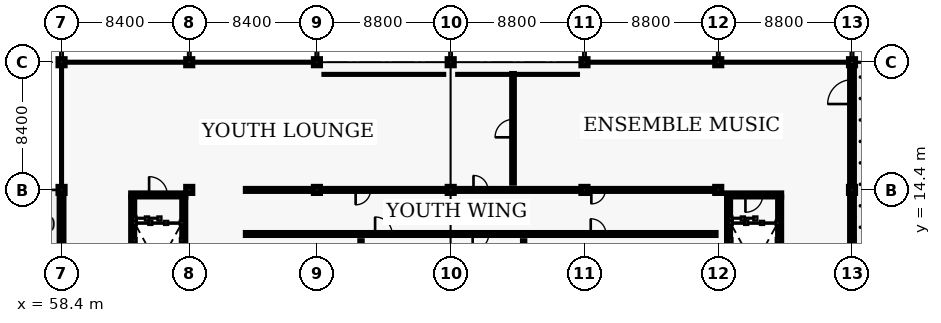
"""IFC4 building model, lengths in metres.
Left out: names, types, materials, properties, quantities, classifications, styles, units other than length and angle.
Written with IfcOpenShell. Run it as: python <this file> out.ifc"""

import sys

from ifc_helpers import new_model, si_unit, direction, frame, frame_2d, origin, origin_2d, place, context, subcontext, project, spatial, rectangle, extrude, element, fill, save


model = new_model("IFC4")
c1 = context("Model", 3, precision=1e-05, world=origin(), true_north=direction((0.0, 1.0)))
c2 = subcontext(c1, "Body", "Model", "MODEL_VIEW")
j1 = project(units=[si_unit("LENGTHUNIT", "METRE"), si_unit("PLANEANGLEUNIT", "RADIAN")], contexts=[c1])
p1 = place(None, origin())
s1 = spatial("IfcSite", under=j1, at=p1, CompositionType="ELEMENT")
p2 = place(p1, origin())
s2 = spatial("IfcBuilding", under=s1, at=p2, CompositionType="ELEMENT")
p3 = place(p2, frame((0.0, 0.0, 9.0)))
s3 = spatial("IfcBuildingStorey", under=s2, at=p3, CompositionType="ELEMENT", Elevation=9.0)
for number, where, z_axis, x_axis in (
    (1, (58.4, 14.4, 0.0), (0.0, 0.0, 1.0), (1.0, 0.0, 0.0)),
    (2, (58.4, 22.8, 0.0), (0.0, 0.0, 1.0), (1.0, 0.0, 0.0)),
    (3, (66.8, 14.4, 0.0), (0.0, 0.0, 1.0), (1.0, 0.0, 0.0)),
    (4, (66.8, 22.8, 0.0), (0.0, 0.0, 1.0), (1.0, 0.0, 0.0)),
    (5, (75.2, 14.4, 0.0), (0.0, 0.0, 1.0), (1.0, 0.0, 0.0)),
    (6, (75.2, 22.8, 0.0), (0.0, 0.0, 1.0), (1.0, 0.0, 0.0)),
    (7, (84.0, 14.4, 0.0), (0.0, 0.0, 1.0), (1.0, 0.0, 0.0)),
    (8, (84.0, 22.8, 0.0), (0.0, 0.0, 1.0), (1.0, 0.0, 0.0)),
    (9, (92.8, 14.4, 0.0), (0.0, 0.0, 1.0), (1.0, 0.0, 0.0)),
    (10, (92.8, 22.8, 0.0), (0.0, 0.0, 1.0), (1.0, 0.0, 0.0)),
    (11, (101.6, 14.4, 0.0), (0.0, 0.0, 1.0), (1.0, 0.0, 0.0)),
    (12, (101.6, 22.8, 0.0), (0.0, 0.0, 1.0), (1.0, 0.0, 0.0)),
    (13, (110.4, 14.4, 0.0), (0.0, 0.0, 1.0), (1.0, 0.0, 0.0)),
    (14, (110.4, 22.8, 0.0), (0.0, 0.0, 1.0), (1.0, 0.0, 0.0)),
):
    element("IfcColumn", number, at=place(p3, frame(where, z_axis=z_axis, x_axis=x_axis)), inside=s3, PredefinedType="COLUMN", context=c2, shape_type="SweptSolid", body=[
        extrude(rectangle(XDim=0.45, YDim=0.45, at=origin_2d()), origin(), (0.0, 0.0, 1.0), 3.9),
    ])
p4 = place(p3, frame((58.4, 6.1, 0.0), z_axis=(0.0, 0.0, 1.0), x_axis=(0.0, 1.0, 0.0)))
e15 = element("IfcWall", 15, at=p4, inside=s3, PredefinedType="SOLIDWALL", context=c2, shape_type="SweptSolid", body=[
    extrude(rectangle(XDim=8.2, YDim=0.3, at=frame_2d((4.1, 0.0))), origin(), (0.0, 0.0, 1.0), 3.425),
])
p5 = place(p4, frame((3.3, 0.0, 0.9)))
e16 = element("IfcOpeningElement", 16, at=p5, cuts=e15, PredefinedType="OPENING", context=c2, shape_type="SweptSolid", body=[
    extrude(rectangle(XDim=1.6, YDim=2.1, at=frame_2d((0.8, 1.05))), frame((0.0, 0.16, 0.0), z_axis=(0.0, -1.0, 0.0), x_axis=(1.0, 0.0, 0.0)), (0.0, 0.0, 1.0), 0.32),
])
p6 = place(p3, frame((110.4, 6.1, 0.0), z_axis=(0.0, 0.0, 1.0), x_axis=(0.0, 1.0, 0.0)))
e17 = element("IfcWall", 17, at=p6, inside=s3, PredefinedType="SOLIDWALL", context=c2, shape_type="SweptSolid", body=[
    extrude(rectangle(XDim=8.2, YDim=0.3, at=frame_2d((4.1, 0.0))), origin(), (0.0, 0.0, 1.0), 3.425),
])
p7 = place(p6, frame((3.3, 0.0, 0.9)))
e18 = element("IfcOpeningElement", 18, at=p7, cuts=e17, PredefinedType="OPENING", context=c2, shape_type="SweptSolid", body=[
    extrude(rectangle(XDim=1.6, YDim=2.1, at=frame_2d((0.8, 1.05))), frame((0.0, 0.16, 0.0), z_axis=(0.0, -1.0, 0.0), x_axis=(1.0, 0.0, 0.0)), (0.0, 0.0, 1.0), 0.32),
])
p8 = place(p3, frame((110.4, 14.5, 0.0), z_axis=(0.0, 0.0, 1.0), x_axis=(0.0, 1.0, 0.0)))
e19 = element("IfcWall", 19, at=p8, inside=s3, PredefinedType="SOLIDWALL", context=c2, shape_type="SweptSolid", body=[
    extrude(rectangle(XDim=8.2, YDim=0.3, at=frame_2d((4.1, 0.0))), origin(), (0.0, 0.0, 1.0), 3.425),
])
p9 = place(p8, frame((3.3, 0.0, 0.9)))
e20 = element("IfcOpeningElement", 20, at=p9, cuts=e19, PredefinedType="OPENING", context=c2, shape_type="SweptSolid", body=[
    extrude(rectangle(XDim=1.6, YDim=2.1, at=frame_2d((0.8, 1.05))), frame((0.0, 0.16, 0.0), z_axis=(0.0, -1.0, 0.0), x_axis=(1.0, 0.0, 0.0)), (0.0, 0.0, 1.0), 0.32),
])
p10 = place(p8, frame((5.55, 0.0, 0.0)))
e21 = element("IfcOpeningElement", 21, at=p10, cuts=e19, PredefinedType="OPENING", context=c2, shape_type="SweptSolid", body=[
    extrude(rectangle(XDim=1.6, YDim=2.2, at=frame_2d((0.8, 1.1))), frame((0.0, 0.16, 0.0), z_axis=(0.0, -1.0, 0.0), x_axis=(1.0, 0.0, 0.0)), (0.0, 0.0, 1.0), 0.32),
])
p11 = place(p3, frame((62.955, 14.07, 0.0), z_axis=(0.0, 0.0, 1.0), x_axis=(1.0, 0.0, 0.0)))
e22 = element("IfcWall", 22, at=p11, inside=s3, PredefinedType="SHEAR", context=c2, shape_type="SweptSolid", body=[
    extrude(rectangle(XDim=3.61, YDim=0.25, at=frame_2d((1.805, 0.0))), origin(), (0.0, 0.0, 1.0), 3.66),
])
p12 = place(p11, frame((1.205, 0.0, 0.0)))
e23 = element("IfcOpeningElement", 23, at=p12, cuts=e22, PredefinedType="OPENING", context=c2, shape_type="SweptSolid", body=[
    extrude(rectangle(XDim=1.2, YDim=2.15, at=frame_2d((0.6, 1.075))), frame((0.0, 0.135, 0.0), z_axis=(0.0, -1.0, 0.0), x_axis=(1.0, 0.0, 0.0)), (0.0, 0.0, 1.0), 0.27),
])
for number, where, z_axis, x_axis in (
    (24, (66.44, 13.945, 0.0), (0.0, 0.0, 1.0), (0.0, -1.0, 0.0)),
    (25, (63.08, 6.555, 0.0), (0.0, 0.0, 1.0), (0.0, 1.0, 0.0)),
):
    element("IfcWall", number, at=place(p3, frame(where, z_axis=z_axis, x_axis=x_axis)), inside=s3, PredefinedType="SHEAR", context=c2, shape_type="SweptSolid", body=[
        extrude(rectangle(XDim=7.39, YDim=0.25, at=frame_2d((3.695, 0.0))), origin(), (0.0, 0.0, 1.0), 3.66),
    ])
p13 = place(p3, frame((102.155, 14.07, 0.0), z_axis=(0.0, 0.0, 1.0), x_axis=(1.0, 0.0, 0.0)))
e26 = element("IfcWall", 26, at=p13, inside=s3, PredefinedType="SHEAR", context=c2, shape_type="SweptSolid", body=[
    extrude(rectangle(XDim=3.61, YDim=0.25, at=frame_2d((1.805, 0.0))), origin(), (0.0, 0.0, 1.0), 3.66),
])
p14 = place(p13, frame((1.235, 0.0, 0.0)))
e27 = element("IfcOpeningElement", 27, at=p14, cuts=e26, PredefinedType="OPENING", context=c2, shape_type="SweptSolid", body=[
    extrude(rectangle(XDim=1.14, YDim=2.15, at=frame_2d((0.57, 1.075))), frame((0.0, 0.135, 0.0), z_axis=(0.0, -1.0, 0.0), x_axis=(1.0, 0.0, 0.0)), (0.0, 0.0, 1.0), 0.27),
])
for number, where, z_axis, x_axis in (
    (28, (105.64, 13.945, 0.0), (0.0, 0.0, 1.0), (0.0, -1.0, 0.0)),
    (29, (102.28, 6.555, 0.0), (0.0, 0.0, 1.0), (0.0, 1.0, 0.0)),
):
    element("IfcWall", number, at=place(p3, frame(where, z_axis=z_axis, x_axis=x_axis)), inside=s3, PredefinedType="SHEAR", context=c2, shape_type="SweptSolid", body=[
        extrude(rectangle(XDim=7.39, YDim=0.25, at=frame_2d((3.695, 0.0))), origin(), (0.0, 0.0, 1.0), 3.66),
    ])
p15 = place(p3, frame((70.5, 11.5, 0.0), z_axis=(0.0, 0.0, 1.0), x_axis=(1.0, 0.0, 0.0)))
e30 = element("IfcWall", 30, at=p15, inside=s3, PredefinedType="PARTITIONING", context=c2, shape_type="SweptSolid", body=[
    extrude(rectangle(XDim=30.95, YDim=0.18, at=frame_2d((15.475, 0.0))), origin(), (0.0, 0.0, 1.0), 3.425),
])
p16 = place(p15, frame((8.527, 0.0, 0.0)))
e31 = element("IfcOpeningElement", 31, at=p16, cuts=e30, PredefinedType="OPENING", context=c2, shape_type="SweptSolid", body=[
    extrude(rectangle(XDim=1.12, YDim=2.16, at=frame_2d((0.56, 1.08))), frame((0.0, 0.1, 0.0), z_axis=(0.0, -1.0, 0.0), x_axis=(1.0, 0.0, 0.0)), (0.0, 0.0, 1.0), 0.2),
])
p17 = place(p15, frame((14.945, 0.0, 0.0)))
e32 = element("IfcOpeningElement", 32, at=p17, cuts=e30, PredefinedType="OPENING", context=c2, shape_type="SweptSolid", body=[
    extrude(rectangle(XDim=1.06, YDim=2.16, at=frame_2d((0.53, 1.08))), frame((0.0, 0.1, 0.0), z_axis=(0.0, -1.0, 0.0), x_axis=(1.0, 0.0, 0.0)), (0.0, 0.0, 1.0), 0.2),
])
p18 = place(p15, frame((22.713, 0.0, 0.0)))
e33 = element("IfcOpeningElement", 33, at=p18, cuts=e30, PredefinedType="OPENING", context=c2, shape_type="SweptSolid", body=[
    extrude(rectangle(XDim=1.0, YDim=2.14, at=frame_2d((0.5, 1.07))), frame((0.0, 0.1, 0.0), z_axis=(0.0, -1.0, 0.0), x_axis=(1.0, 0.0, 0.0)), (0.0, 0.0, 1.0), 0.2),
])
p19 = place(p3, frame((70.5, 14.4, 0.0), z_axis=(0.0, 0.0, 1.0), x_axis=(1.0, 0.0, 0.0)))
e34 = element("IfcWall", 34, at=p19, inside=s3, PredefinedType="PARTITIONING", context=c2, shape_type="SweptSolid", body=[
    extrude(rectangle(XDim=30.95, YDim=0.18, at=frame_2d((15.475, 0.0))), origin(), (0.0, 0.0, 1.0), 3.346),
])
p20 = place(p19, frame((7.247, 0.0, 0.0)))
e35 = element("IfcOpeningElement", 35, at=p20, cuts=e34, PredefinedType="OPENING", context=c2, shape_type="SweptSolid", body=[
    extrude(rectangle(XDim=0.98, YDim=2.12, at=frame_2d((0.49, 1.06))), frame((0.0, 0.1, 0.0), z_axis=(0.0, -1.0, 0.0), x_axis=(1.0, 0.0, 0.0)), (0.0, 0.0, 1.0), 0.2),
])
p21 = place(p19, frame((15.0, 0.0, 0.0)))
e36 = element("IfcOpeningElement", 36, at=p21, cuts=e34, PredefinedType="OPENING", context=c2, shape_type="SweptSolid", body=[
    extrude(rectangle(XDim=0.95, YDim=2.12, at=frame_2d((0.475, 1.06))), frame((0.0, 0.1, 0.0), z_axis=(0.0, -1.0, 0.0), x_axis=(1.0, 0.0, 0.0)), (0.0, 0.0, 1.0), 0.2),
])
p22 = place(p19, frame((22.753, 0.0, 0.0)))
e37 = element("IfcOpeningElement", 37, at=p22, cuts=e34, PredefinedType="OPENING", context=c2, shape_type="SweptSolid", body=[
    extrude(rectangle(XDim=0.92, YDim=2.1, at=frame_2d((0.46, 1.05))), frame((0.0, 0.1, 0.0), z_axis=(0.0, -1.0, 0.0), x_axis=(1.0, 0.0, 0.0)), (0.0, 0.0, 1.0), 0.2),
])
p23 = place(p3, frame((78.1, 6.55, 0.0), z_axis=(0.0, 0.0, 1.0), x_axis=(0.0, 1.0, 0.0)))
e38 = element("IfcWall", 38, at=p23, inside=s3, PredefinedType="PARTITIONING", context=c2, shape_type="SweptSolid", body=[
    extrude(rectangle(XDim=4.5, YDim=0.14, at=frame_2d((2.25, 0.0))), origin(), (0.0, 0.0, 1.0), 3.527),
])
p24 = place(p23, frame((1.77, 0.0, 0.0)))
e39 = element("IfcOpeningElement", 39, at=p24, cuts=e38, PredefinedType="OPENING", context=c2, shape_type="SweptSolid", body=[
    extrude(rectangle(XDim=0.96, YDim=2.08, at=frame_2d((0.48, 1.04))), frame((0.0, 0.08, 0.0), z_axis=(0.0, -1.0, 0.0), x_axis=(1.0, 0.0, 0.0)), (0.0, 0.0, 1.0), 0.16),
])
p25 = place(p3, frame((88.8, 6.55, 0.0), z_axis=(0.0, 0.0, 1.0), x_axis=(0.0, 1.0, 0.0)))
e40 = element("IfcWall", 40, at=p25, inside=s3, PredefinedType="PARTITIONING", context=c2, shape_type="SweptSolid", body=[
    extrude(rectangle(XDim=4.5, YDim=0.14, at=frame_2d((2.25, 0.0))), origin(), (0.0, 0.0, 1.0), 3.645),
])
p26 = place(p25, frame((1.8, 0.0, 0.0)))
e41 = element("IfcOpeningElement", 41, at=p26, cuts=e40, PredefinedType="OPENING", context=c2, shape_type="SweptSolid", body=[
    extrude(rectangle(XDim=0.9, YDim=2.06, at=frame_2d((0.45, 1.03))), frame((0.0, 0.08, 0.0), z_axis=(0.0, -1.0, 0.0), x_axis=(1.0, 0.0, 0.0)), (0.0, 0.0, 1.0), 0.16),
])
p27 = place(p3, frame((88.1, 14.85, 0.0), z_axis=(0.0, 0.0, 1.0), x_axis=(0.0, 1.0, 0.0)))
e42 = element("IfcWall", 42, at=p27, inside=s3, PredefinedType="PARTITIONING", context=c2, shape_type="SweptSolid", body=[
    extrude(rectangle(XDim=7.2, YDim=0.16, at=frame_2d((3.6, 0.0))), origin(), (0.0, 0.0, 1.0), 3.645),
])
p28 = place(p27, frame((3.01, 0.0, 0.0)))
e43 = element("IfcOpeningElement", 43, at=p28, cuts=e42, PredefinedType="OPENING", context=c2, shape_type="SweptSolid", body=[
    extrude(rectangle(XDim=1.18, YDim=2.18, at=frame_2d((0.59, 1.09))), frame((0.0, 0.09, 0.0), z_axis=(0.0, -1.0, 0.0), x_axis=(1.0, 0.0, 0.0)), (0.0, 0.0, 1.0), 0.18),
])
p29 = place(p5, origin())
e44 = element("IfcWindow", 44, at=p29, inside=s3, PartitioningType="SINGLE_PANEL", PredefinedType="WINDOW", context=c2, shape_type="SweptSolid", body=[
    extrude(rectangle(XDim=1.6, YDim=2.1, at=frame_2d((0.8, 1.05))), frame((0.0, 0.03, 0.0), z_axis=(0.0, -1.0, 0.0), x_axis=(1.0, 0.0, 0.0)), (0.0, 0.0, 1.0), 0.06),
])
fill(e16, e44)
p30 = place(p7, origin())
e45 = element("IfcWindow", 45, at=p30, inside=s3, PartitioningType="SINGLE_PANEL", PredefinedType="WINDOW", context=c2, shape_type="SweptSolid", body=[
    extrude(rectangle(XDim=1.6, YDim=2.1, at=frame_2d((0.8, 1.05))), frame((0.0, 0.03, 0.0), z_axis=(0.0, -1.0, 0.0), x_axis=(1.0, 0.0, 0.0)), (0.0, 0.0, 1.0), 0.06),
])
fill(e18, e45)
p31 = place(p9, origin())
e46 = element("IfcWindow", 46, at=p31, inside=s3, PartitioningType="SINGLE_PANEL", PredefinedType="WINDOW", context=c2, shape_type="SweptSolid", body=[
    extrude(rectangle(XDim=1.6, YDim=2.1, at=frame_2d((0.8, 1.05))), frame((0.0, 0.03, 0.0), z_axis=(0.0, -1.0, 0.0), x_axis=(1.0, 0.0, 0.0)), (0.0, 0.0, 1.0), 0.06),
])
fill(e20, e46)
p32 = place(p12, origin())
e47 = element("IfcDoor", 47, at=p32, inside=s3, OperationType="SINGLE_SWING_LEFT", PredefinedType="DOOR", context=c2, shape_type="SweptSolid", body=[
    extrude(rectangle(XDim=1.2, YDim=2.15, at=frame_2d((0.6, 1.075))), frame((0.0, 0.025, 0.0), z_axis=(0.0, -1.0, 0.0), x_axis=(1.0, 0.0, 0.0)), (0.0, 0.0, 1.0), 0.05),
])
fill(e23, e47)
p33 = place(p14, origin())
e48 = element("IfcDoor", 48, at=p33, inside=s3, OperationType="SINGLE_SWING_RIGHT", PredefinedType="DOOR", context=c2, shape_type="SweptSolid", body=[
    extrude(rectangle(XDim=1.14, YDim=2.15, at=frame_2d((0.57, 1.075))), frame((0.0, 0.025, 0.0), z_axis=(0.0, -1.0, 0.0), x_axis=(1.0, 0.0, 0.0)), (0.0, 0.0, 1.0), 0.05),
])
fill(e27, e48)
p34 = place(p10, origin())
e49 = element("IfcDoor", 49, at=p34, inside=s3, OperationType="DOUBLE_DOOR_SINGLE_SWING", PredefinedType="DOOR", context=c2, shape_type="SweptSolid", body=[
    extrude(rectangle(XDim=1.6, YDim=2.2, at=frame_2d((0.8, 1.1))), frame((0.0, 0.025, 0.0), z_axis=(0.0, -1.0, 0.0), x_axis=(1.0, 0.0, 0.0)), (0.0, 0.0, 1.0), 0.05),
])
fill(e21, e49)
p35 = place(p16, origin())
e50 = element("IfcDoor", 50, at=p35, inside=s3, OperationType="SINGLE_SWING_LEFT", PredefinedType="DOOR", context=c2, shape_type="SweptSolid", body=[
    extrude(rectangle(XDim=1.12, YDim=2.16, at=frame_2d((0.56, 1.08))), frame((0.0, 0.025, 0.0), z_axis=(0.0, -1.0, 0.0), x_axis=(1.0, 0.0, 0.0)), (0.0, 0.0, 1.0), 0.05),
])
fill(e31, e50)
p36 = place(p17, origin())
e51 = element("IfcDoor", 51, at=p36, inside=s3, OperationType="SINGLE_SWING_RIGHT", PredefinedType="DOOR", context=c2, shape_type="SweptSolid", body=[
    extrude(rectangle(XDim=1.06, YDim=2.16, at=frame_2d((0.53, 1.08))), frame((0.0, 0.025, 0.0), z_axis=(0.0, -1.0, 0.0), x_axis=(1.0, 0.0, 0.0)), (0.0, 0.0, 1.0), 0.05),
])
fill(e32, e51)
p37 = place(p18, origin())
e52 = element("IfcDoor", 52, at=p37, inside=s3, OperationType="SINGLE_SWING_LEFT", PredefinedType="DOOR", context=c2, shape_type="SweptSolid", body=[
    extrude(rectangle(XDim=1.0, YDim=2.14, at=frame_2d((0.5, 1.07))), frame((0.0, 0.025, 0.0), z_axis=(0.0, -1.0, 0.0), x_axis=(1.0, 0.0, 0.0)), (0.0, 0.0, 1.0), 0.05),
])
fill(e33, e52)
p38 = place(p20, origin())
e53 = element("IfcDoor", 53, at=p38, inside=s3, OperationType="SINGLE_SWING_RIGHT", PredefinedType="DOOR", context=c2, shape_type="SweptSolid", body=[
    extrude(rectangle(XDim=0.98, YDim=2.12, at=frame_2d((0.49, 1.06))), frame((0.0, 0.025, 0.0), z_axis=(0.0, -1.0, 0.0), x_axis=(1.0, 0.0, 0.0)), (0.0, 0.0, 1.0), 0.05),
])
fill(e35, e53)
p39 = place(p21, origin())
e54 = element("IfcDoor", 54, at=p39, inside=s3, OperationType="SINGLE_SWING_LEFT", PredefinedType="DOOR", context=c2, shape_type="SweptSolid", body=[
    extrude(rectangle(XDim=0.95, YDim=2.12, at=frame_2d((0.475, 1.06))), frame((0.0, 0.025, 0.0), z_axis=(0.0, -1.0, 0.0), x_axis=(1.0, 0.0, 0.0)), (0.0, 0.0, 1.0), 0.05),
])
fill(e36, e54)
p40 = place(p22, origin())
e55 = element("IfcDoor", 55, at=p40, inside=s3, OperationType="SINGLE_SWING_RIGHT", PredefinedType="DOOR", context=c2, shape_type="SweptSolid", body=[
    extrude(rectangle(XDim=0.92, YDim=2.1, at=frame_2d((0.46, 1.05))), frame((0.0, 0.025, 0.0), z_axis=(0.0, -1.0, 0.0), x_axis=(1.0, 0.0, 0.0)), (0.0, 0.0, 1.0), 0.05),
])
fill(e37, e55)
p41 = place(p28, origin())
e56 = element("IfcDoor", 56, at=p41, inside=s3, OperationType="SINGLE_SWING_LEFT", PredefinedType="DOOR", context=c2, shape_type="SweptSolid", body=[
    extrude(rectangle(XDim=1.18, YDim=2.18, at=frame_2d((0.59, 1.09))), frame((0.0, 0.025, 0.0), z_axis=(0.0, -1.0, 0.0), x_axis=(1.0, 0.0, 0.0)), (0.0, 0.0, 1.0), 0.05),
])
fill(e43, e56)
save(model, sys.argv[1])
